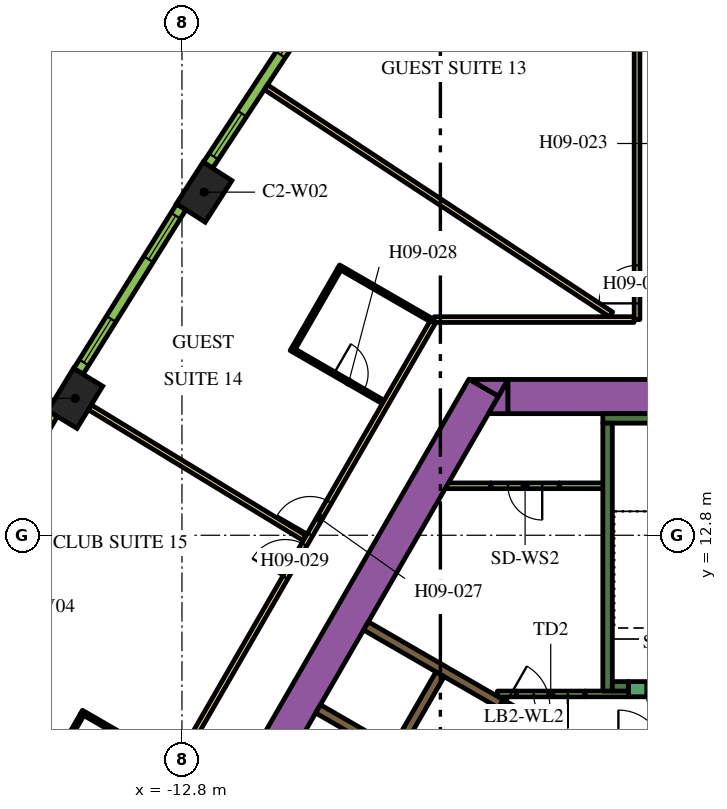
"""IFC4 building model, lengths in metres.
Left out: names, types, materials, properties, quantities, classifications, styles, units other than length and angle.
Written with IfcOpenShell. Run it as: python <this file> out.ifc"""

import sys

from ifc_helpers import new_model, si_unit, direction, frame, frame_2d, origin, origin_2d, place, context, subcontext, project, spatial, polyline, rectangle, outline, extrude, element, fill, save


model = new_model("IFC4")
c1 = context("Model", 3, precision=1e-05, world=origin(), true_north=direction((0.0, 1.0)))
c2 = subcontext(c1, "Body", "Model", "MODEL_VIEW")
j1 = project(units=[si_unit("LENGTHUNIT", "METRE"), si_unit("PLANEANGLEUNIT", "RADIAN")], contexts=[c1])
p1 = place(None, origin())
s1 = spatial("IfcSite", under=j1, at=p1, CompositionType="ELEMENT")
p2 = place(p1, origin())
s2 = spatial("IfcBuilding", under=s1, at=p2, CompositionType="ELEMENT")
p3 = place(p2, frame((0.0, 0.0, 126.6)))
s3 = spatial("IfcBuildingStorey", under=s2, at=p3, CompositionType="ELEMENT", Elevation=126.6)
for number, where, z_axis, x_axis in (
    (1, (-12.217, 21.828, 0.0), (0.0, 0.0, 1.0), (-0.54, -0.842, 0.0)),
    (2, (-15.609, 16.402, 0.0), (0.0, 0.0, 1.0), (-0.52, -0.854, 0.0)),
):
    element("IfcColumn", number, at=place(p3, frame(where, z_axis=z_axis, x_axis=x_axis)), inside=s3, PredefinedType="COLUMN", context=c2, shape_type="SweptSolid", body=[
        extrude(rectangle(XDim=1.3, YDim=0.9, at=origin_2d()), origin(), (0.0, 0.0, 1.0), 3.9),
    ])
p4 = place(p3, frame((-14.268, 0.387, 0.0), z_axis=(0.0, 0.0, 1.0), x_axis=(0.499994617707, 0.866028511231, 0.0)))
e3 = element("IfcWall", 3, at=p4, inside=s3, PredefinedType="SOLIDWALL", context=c2, shape_type="SweptSolid", body=[
    extrude(rectangle(XDim=18.817, YDim=0.9, at=frame_2d((9.409, 0.0))), origin(), (0.0, 0.0, 1.0), 3.9),
])
p5 = place(p3, origin())
e4 = element("IfcWall", 4, at=p5, inside=s3, PredefinedType="SOLIDWALL", context=c2, shape_type="SweptSolid", body=[
    extrude(outline(polyline([(-4.215, 16.9), (-4.469, 16.46), (-5.231, 16.9), (-4.215, 16.9)])), origin(), (0.0, 0.0, 1.0), 3.9),
])
p6 = place(p3, frame((-4.224, 16.45, 0.0), z_axis=(0.0, 0.0, 1.0), x_axis=(1.0, 0.0, 0.0)))
e5 = element("IfcWall", 5, at=p6, inside=s3, PredefinedType="SOLIDWALL", context=c2, shape_type="SweptSolid", body=[
    extrude(rectangle(XDim=9.488, YDim=0.9, at=frame_2d((4.744, 0.0))), origin(), (0.0, 0.0, 1.0), 3.9),
])
e6 = element("IfcWall", 6, at=p5, inside=s3, PredefinedType="SOLIDWALL", context=c2, shape_type="SweptSolid", body=[
    extrude(outline(polyline([(-4.734, 16.0), (-4.226, 16.88), (-4.226, 16.0), (-4.734, 16.0)])), origin(), (0.0, 0.0, 1.0), 3.9),
])
p7 = place(p3, frame((-1.725, 15.875, 0.0), z_axis=(0.0, 0.0, 1.0), x_axis=(1.0, 0.0, 0.0)))
e7 = element("IfcWall", 7, at=p7, inside=s3, PredefinedType="SOLIDWALL", context=c2, shape_type="SweptSolid", body=[
    extrude(rectangle(XDim=3.45, YDim=0.25, at=frame_2d((1.725, 0.0))), origin(), (0.0, 0.0, 1.0), 3.9),
])
p8 = place(p3, frame((-1.6, 8.7, 0.0), z_axis=(0.0, 0.0, 1.0), x_axis=(0.0, 1.0, 0.0)))
e8 = element("IfcWall", 8, at=p8, inside=s3, PredefinedType="SOLIDWALL", context=c2, shape_type="SweptSolid", body=[
    extrude(rectangle(XDim=7.05, YDim=0.25, at=frame_2d((3.525, 0.0))), origin(), (0.0, 0.0, 1.0), 3.9),
])
p9 = place(p3, frame((-1.475, 8.825, 0.0), z_axis=(0.0, 0.0, 1.0), x_axis=(1.0, 0.0, 0.0)))
e9 = element("IfcWall", 9, at=p9, inside=s3, PredefinedType="SOLIDWALL", context=c2, shape_type="SweptSolid", body=[
    extrude(rectangle(XDim=0.425, YDim=0.25, at=frame_2d((0.212, 0.0))), origin(), (0.0, 0.0, 1.0), 3.9),
])
e10 = element("IfcWall", 10, at=p5, inside=s3, PredefinedType="SOLIDWALL", context=c2, shape_type="SweptSolid", body=[
    extrude(outline(polyline([(-3.128, 7.481), (-3.259, 7.557), (-3.134, 7.773), (-3.003, 7.698), (-3.128, 7.481)])), origin(), (0.0, 0.0, 1.0), 3.9),
])
p10 = place(p3, frame((-7.314, 7.132, 0.0), z_axis=(0.0, 0.0, 1.0), x_axis=(-0.866008176907, 0.50002983664, 0.0)))
e11 = element("IfcWall", 11, at=p10, inside=s3, PredefinedType="SOLIDWALL", context=c2, shape_type="SweptSolid", body=[
    extrude(rectangle(XDim=2.2, YDim=0.25, at=frame_2d((1.1, 0.0))), origin(), (0.0, 0.0, 1.0), 3.9),
])
p11 = place(p3, frame((-7.959, 10.415, 0.0), z_axis=(0.0, 0.0, 1.0), x_axis=(0.866020958405, -0.500007699544, 0.0)))
e12 = element("IfcWall", 12, at=p11, inside=s3, PredefinedType="SOLIDWALL", context=c2, shape_type="SweptSolid", body=[
    extrude(rectangle(XDim=4.1, YDim=0.25, at=frame_2d((2.05, 0.0))), origin(), (0.0, 0.0, 1.0), 3.9),
])
p12 = place(p3, frame((-3.997, 8.625, 0.0), z_axis=(0.0, 0.0, 1.0), x_axis=(-1.0, 0.0, 0.0)))
e13 = element("IfcWall", 13, at=p12, inside=s3, PredefinedType="PARTITIONING", context=c2, shape_type="SweptSolid", body=[
    extrude(rectangle(XDim=0.502, YDim=0.15, at=frame_2d((0.251, 0.0))), origin(), (0.0, 0.0, 1.0), 2.75),
])
p13 = place(p3, frame((-5.851, 14.102, 0.0), z_axis=(0.0, 0.0, 1.0), x_axis=(1.0, 0.0, 0.0)))
e14 = element("IfcWall", 14, at=p13, inside=s3, PredefinedType="PARTITIONING", context=c2, shape_type="SweptSolid", body=[
    extrude(rectangle(XDim=1.18, YDim=0.15, at=frame_2d((0.59, 0.0))), origin(), (0.0, 0.0, 1.0), 2.75),
])
p14 = place(p3, frame((-2.196, 8.625, 0.0), z_axis=(0.0, 0.0, 1.0), x_axis=(1.0, 0.0, 0.0)))
e15 = element("IfcWall", 15, at=p14, inside=s3, PredefinedType="PARTITIONING", context=c2, shape_type="SweptSolid", body=[
    extrude(rectangle(XDim=1.146, YDim=0.15, at=frame_2d((0.573, 0.0))), origin(), (0.0, 0.0, 1.0), 2.75),
])
p15 = place(p3, frame((-2.871, 14.102, 0.0), z_axis=(0.0, 0.0, 1.0), x_axis=(1.0, 0.0, 0.0)))
e16 = element("IfcWall", 16, at=p15, inside=s3, PredefinedType="PARTITIONING", context=c2, shape_type="SweptSolid", body=[
    extrude(rectangle(XDim=1.196, YDim=0.15, at=frame_2d((0.598, 0.0))), origin(), (0.0, 0.0, 1.0), 2.75),
])
p16 = place(p3, frame((-6.008, 9.144, 0.0), z_axis=(0.0, 0.0, 1.0), x_axis=(-0.500006956611, -0.866021387346, 0.0)))
e17 = element("IfcWall", 17, at=p16, inside=s3, PredefinedType="SOLIDWALL", context=c2, shape_type="SweptSolid", body=[
    extrude(rectangle(XDim=9.83, YDim=0.25, at=frame_2d((4.915, 0.0))), origin(), (0.0, 0.0, 1.0), 3.9),
])
p17 = place(p16, frame((6.985, 0.0, 0.0)))
e18 = element("IfcOpeningElement", 18, at=p17, cuts=e17, PredefinedType="OPENING", context=c2, shape_type="SweptSolid", body=[
    extrude(rectangle(XDim=0.9, YDim=2.1, at=frame_2d((0.45, 1.05))), frame((0.0, 0.135, 0.0), z_axis=(0.0, -1.0, 0.0), x_axis=(1.0, 0.0, 0.0)), (0.0, 0.0, 1.0), 0.27),
])
p18 = place(p3, frame((1.05, 8.75, 0.0), z_axis=(0.0, 0.0, 1.0), x_axis=(-1.0, 0.0, 0.0)))
e19 = element("IfcWall", 19, at=p18, inside=s3, PredefinedType="SOLIDWALL", context=c2, shape_type="SweptSolid", body=[
    extrude(rectangle(XDim=2.1, YDim=0.4, at=frame_2d((1.05, 0.0))), origin(), (0.0, 0.0, 1.0), 3.9),
])
p19 = place(p18, frame((0.45, 0.0, 0.0)))
e20 = element("IfcOpeningElement", 20, at=p19, cuts=e19, PredefinedType="OPENING", context=c2, shape_type="SweptSolid", body=[
    extrude(rectangle(XDim=1.2, YDim=2.1, at=frame_2d((0.6, 1.05))), frame((0.0, 0.21, 0.0), z_axis=(0.0, -1.0, 0.0), x_axis=(1.0, 0.0, 0.0)), (0.0, 0.0, 1.0), 0.42),
])
p20 = place(p3, frame((-2.196, 8.625, 0.0), z_axis=(0.0, 0.0, 1.0), x_axis=(-1.0, 0.0, 0.0)))
e21 = element("IfcWall", 21, at=p20, inside=s3, PredefinedType="PARTITIONING", context=c2, shape_type="SweptSolid", body=[
    extrude(rectangle(XDim=1.8, YDim=0.15, at=frame_2d((0.9, 0.0))), origin(), (0.0, 0.0, 1.0), 2.75),
])
p21 = place(p20, frame((0.45, 0.0, 0.0)))
e22 = element("IfcOpeningElement", 22, at=p21, cuts=e21, PredefinedType="OPENING", context=c2, shape_type="SweptSolid", body=[
    extrude(rectangle(XDim=0.9, YDim=2.1, at=frame_2d((0.45, 1.05))), frame((0.0, 0.085, 0.0), z_axis=(0.0, -1.0, 0.0), x_axis=(1.0, 0.0, 0.0)), (0.0, 0.0, 1.0), 0.17),
])
p22 = place(p3, frame((-4.409, 8.365, 0.0), z_axis=(0.0, 0.0, 1.0), x_axis=(0.866034573852, -0.49998411664, 0.0)))
e23 = element("IfcWall", 23, at=p22, inside=s3, PredefinedType="SOLIDWALL", context=c2, shape_type="SweptSolid", body=[
    extrude(rectangle(XDim=1.4, YDim=0.25, at=frame_2d((0.7, 0.0))), origin(), (0.0, 0.0, 1.0), 3.9),
])
p23 = place(p22, frame((0.1, 0.0, 0.0)))
e24 = element("IfcOpeningElement", 24, at=p23, cuts=e23, PredefinedType="OPENING", context=c2, shape_type="SweptSolid", body=[
    extrude(rectangle(XDim=1.2, YDim=2.1, at=frame_2d((0.6, 1.05))), frame((0.0, 0.135, 0.0), z_axis=(0.0, -1.0, 0.0), x_axis=(1.0, 0.0, 0.0)), (0.0, 0.0, 1.0), 0.27),
])
p24 = place(p3, frame((-2.871, 14.102, 0.0), z_axis=(0.0, 0.0, 1.0), x_axis=(-1.0, 0.0, 0.0)))
e25 = element("IfcWall", 25, at=p24, inside=s3, PredefinedType="PARTITIONING", context=c2, shape_type="SweptSolid", body=[
    extrude(rectangle(XDim=1.8, YDim=0.15, at=frame_2d((0.9, 0.0))), origin(), (0.0, 0.0, 1.0), 2.75),
])
p25 = place(p24, frame((0.45, 0.0, 0.0)))
e26 = element("IfcOpeningElement", 26, at=p25, cuts=e25, PredefinedType="OPENING", context=c2, shape_type="SweptSolid", body=[
    extrude(rectangle(XDim=0.9, YDim=2.1, at=frame_2d((0.45, 1.05))), frame((0.0, 0.085, 0.0), z_axis=(0.0, -1.0, 0.0), x_axis=(1.0, 0.0, 0.0)), (0.0, 0.0, 1.0), 0.17),
])
p26 = place(p3, frame((-0.825, 18.475, 0.0), z_axis=(0.0, 0.0, 1.0), x_axis=(0.0, 1.0, 0.0)))
e27 = element("IfcWall", 27, at=p26, inside=s3, PredefinedType="PARTITIONING", context=c2, shape_type="SweptSolid", body=[
    extrude(rectangle(XDim=13.623, YDim=0.15, at=frame_2d((6.812, 0.0))), origin(), (0.0, 0.0, 1.0), 2.75),
])
p27 = place(p26, frame((0.427, 0.0, 0.0)))
e28 = element("IfcOpeningElement", 28, at=p27, cuts=e27, PredefinedType="OPENING", context=c2, shape_type="SweptSolid", body=[
    extrude(rectangle(XDim=1.0, YDim=2.1, at=frame_2d((0.5, 1.05))), frame((0.0, 0.085, 0.0), z_axis=(0.0, -1.0, 0.0), x_axis=(1.0, 0.0, 0.0)), (0.0, 0.0, 1.0), 0.17),
])
p28 = place(p3, frame((-6.163, 18.475, 0.0), z_axis=(0.0, 0.0, 1.0), x_axis=(1.0, 0.0, 0.0)))
e29 = element("IfcWall", 29, at=p28, inside=s3, PredefinedType="PARTITIONING", context=c2, shape_type="SweptSolid", body=[
    extrude(rectangle(XDim=5.258, YDim=0.15, at=frame_2d((2.629, 0.0))), origin(), (0.0, 0.0, 1.0), 2.75),
])
p29 = place(p3, frame((-19.081, -3.9, 0.0), z_axis=(0.0, 0.0, 1.0), x_axis=(0.499998313975, 0.866026377209, 0.0)))
e30 = element("IfcWall", 30, at=p29, inside=s3, PredefinedType="PARTITIONING", context=c2, shape_type="SweptSolid", body=[
    extrude(rectangle(XDim=25.766, YDim=0.15, at=frame_2d((12.883, 0.0))), origin(), (0.0, 0.0, 1.0), 2.75),
])
p30 = place(p29, frame((19.306, 0.0, 0.0)))
e31 = element("IfcOpeningElement", 31, at=p30, cuts=e30, PredefinedType="OPENING", context=c2, shape_type="SweptSolid", body=[
    extrude(rectangle(XDim=1.0, YDim=2.1, at=frame_2d((0.5, 1.05))), frame((0.0, 0.085, 0.0), z_axis=(0.0, -1.0, 0.0), x_axis=(1.0, 0.0, 0.0)), (0.0, 0.0, 1.0), 0.17),
])
p31 = place(p29, frame((18.0, 0.0, 0.0)))
e32 = element("IfcOpeningElement", 32, at=p31, cuts=e30, PredefinedType="OPENING", context=c2, shape_type="SweptSolid", body=[
    extrude(rectangle(XDim=1.0, YDim=2.1, at=frame_2d((0.5, 1.05))), frame((0.0, 0.085, 0.0), z_axis=(0.0, -1.0, 0.0), x_axis=(1.0, 0.0, 0.0)), (0.0, 0.0, 1.0), 0.17),
])
p32 = place(p29, frame((7.793, 0.0, 0.0)))
e33 = element("IfcOpeningElement", 33, at=p32, cuts=e30, PredefinedType="OPENING", context=c2, shape_type="SweptSolid", body=[
    extrude(rectangle(XDim=0.9, YDim=2.1, at=frame_2d((0.45, 1.05))), frame((0.0, 0.085, 0.0), z_axis=(0.0, -1.0, 0.0), x_axis=(1.0, 0.0, 0.0)), (0.0, 0.0, 1.0), 0.17),
])
p33 = place(p29, frame((4.674, 0.0, 0.0)))
e34 = element("IfcOpeningElement", 34, at=p33, cuts=e30, PredefinedType="OPENING", context=c2, shape_type="SweptSolid", body=[
    extrude(rectangle(XDim=0.9, YDim=2.1, at=frame_2d((0.45, 1.05))), frame((0.0, 0.085, 0.0), z_axis=(0.0, -1.0, 0.0), x_axis=(1.0, 0.0, 0.0)), (0.0, 0.0, 1.0), 0.17),
])
p34 = place(p29, frame((0.18, 0.0, 0.0)))
e35 = element("IfcOpeningElement", 35, at=p34, cuts=e30, PredefinedType="OPENING", context=c2, shape_type="SweptSolid", body=[
    extrude(rectangle(XDim=1.0, YDim=2.1, at=frame_2d((0.5, 1.05))), frame((0.0, 0.085, 0.0), z_axis=(0.0, -1.0, 0.0), x_axis=(1.0, 0.0, 0.0)), (0.0, 0.0, 1.0), 0.17),
])
p35 = place(p3, frame((-20.581, 8.185, 0.0), z_axis=(0.0, 0.0, 1.0), x_axis=(0.871820720803, -0.489825102233, 0.0)))
e36 = element("IfcWall", 36, at=p35, inside=s3, PredefinedType="PARTITIONING", context=c2, shape_type="SweptSolid", body=[
    extrude(rectangle(XDim=7.257, YDim=0.15, at=frame_2d((3.628, 0.0))), origin(), (0.0, 0.0, 1.0), 2.75),
])
p36 = place(p3, frame((-15.225, 16.167, 0.0), z_axis=(0.0, 0.0, 1.0), x_axis=(0.854088713274, -0.520127359266, 0.0)))
e37 = element("IfcWall", 37, at=p36, inside=s3, PredefinedType="PARTITIONING", context=c2, shape_type="SweptSolid", body=[
    extrude(rectangle(XDim=6.611, YDim=0.15, at=frame_2d((3.305, 0.0))), origin(), (0.0, 0.0, 1.0), 2.75),
])
p37 = place(p3, frame((-10.592, 24.589, 0.0), z_axis=(0.0, 0.0, 1.0), x_axis=(0.835337323748, -0.549737715236, 0.0)))
e38 = element("IfcWall", 38, at=p37, inside=s3, PredefinedType="PARTITIONING", context=c2, shape_type="SweptSolid", body=[
    extrude(rectangle(XDim=10.875, YDim=0.15, at=frame_2d((5.438, 0.0))), origin(), (0.0, 0.0, 1.0), 2.75),
])
p38 = place(p3, frame((-9.928, 17.704, 0.0), z_axis=(0.0, 0.0, 1.0), x_axis=(0.866034573852, -0.49998411664, 0.0)))
e39 = element("IfcWall", 39, at=p38, inside=s3, PredefinedType="PARTITIONING", context=c2, shape_type="SweptSolid", body=[
    extrude(rectangle(XDim=2.8, YDim=0.1, at=frame_2d((1.4, 0.0))), origin(), (0.0, 0.0, 1.0), 2.75),
])
p39 = place(p38, frame((1.3, 0.0, 0.0)))
e40 = element("IfcOpeningElement", 40, at=p39, cuts=e39, PredefinedType="OPENING", context=c2, shape_type="SweptSolid", body=[
    extrude(rectangle(XDim=0.9, YDim=2.1, at=frame_2d((0.45, 1.05))), frame((0.0, 0.06, 0.0), z_axis=(0.0, -1.0, 0.0), x_axis=(1.0, 0.0, 0.0)), (0.0, 0.0, 1.0), 0.12),
])
p40 = place(p3, frame((-9.86, 17.722, 0.0), z_axis=(0.0, 0.0, 1.0), x_axis=(0.500001309137, 0.866024647952, 0.0)))
e41 = element("IfcWall", 41, at=p40, inside=s3, PredefinedType="PARTITIONING", context=c2, shape_type="SweptSolid", body=[
    extrude(rectangle(XDim=2.4, YDim=0.1, at=frame_2d((1.2, 0.0))), origin(), (0.0, 0.0, 1.0), 2.75),
])
p41 = place(p3, frame((-6.253, 18.469, 0.0), z_axis=(0.0, 0.0, 1.0), x_axis=(-0.866034573852, 0.49998411664, 0.0)))
e42 = element("IfcWall", 42, at=p41, inside=s3, PredefinedType="PARTITIONING", context=c2, shape_type="SweptSolid", body=[
    extrude(rectangle(XDim=2.8, YDim=0.1, at=frame_2d((1.4, 0.0))), origin(), (0.0, 0.0, 1.0), 2.75),
])
p42 = place(p3, frame((-13.019, 6.751, 0.0), z_axis=(0.0, 0.0, 1.0), x_axis=(-0.866034573852, 0.49998411664, 0.0)))
e43 = element("IfcWall", 43, at=p42, inside=s3, PredefinedType="PARTITIONING", context=c2, shape_type="SweptSolid", body=[
    extrude(rectangle(XDim=2.8, YDim=0.1, at=frame_2d((1.4, 0.0))), origin(), (0.0, 0.0, 1.0), 2.75),
])
p43 = place(p42, frame((0.6, 0.0, 0.0)))
e44 = element("IfcOpeningElement", 44, at=p43, cuts=e43, PredefinedType="OPENING", context=c2, shape_type="SweptSolid", body=[
    extrude(rectangle(XDim=0.9, YDim=2.1, at=frame_2d((0.45, 1.05))), frame((0.0, 0.06, 0.0), z_axis=(0.0, -1.0, 0.0), x_axis=(1.0, 0.0, 0.0)), (0.0, 0.0, 1.0), 0.12),
])
p44 = place(p3, frame((-15.425, 8.083, 0.0), z_axis=(0.0, 0.0, 1.0), x_axis=(-0.500032858622, -0.866006432019, 0.0)))
e45 = element("IfcWall", 45, at=p44, inside=s3, PredefinedType="PARTITIONING", context=c2, shape_type="SweptSolid", body=[
    extrude(rectangle(XDim=2.36, YDim=0.1, at=frame_2d((1.18, 0.0))), origin(), (0.0, 0.0, 1.0), 2.75),
])
p45 = place(p3, frame((-9.311, 26.799, 0.0), z_axis=(0.0, 0.0, 1.0), x_axis=(-0.549741341923, -0.835334937005, 0.0)))
e46 = element("IfcWall", 46, at=p45, inside=s3, PredefinedType="SOLIDWALL", context=c2, shape_type="SweptSolid", body=[
    extrude(rectangle(XDim=5.1, YDim=0.29, at=frame_2d((2.55, 0.0))), origin(), (0.0, 0.0, 1.0), 3.65),
])
p46 = place(p45, frame((0.273, 0.0, 0.9)))
e47 = element("IfcOpeningElement", 47, at=p46, cuts=e46, PredefinedType="OPENING", context=c2, shape_type="SweptSolid", body=[
    extrude(rectangle(XDim=1.35, YDim=2.15, at=frame_2d((0.675, 1.075))), frame((0.0, 0.155, 0.0), z_axis=(0.0, -1.0, 0.0), x_axis=(1.0, 0.0, 0.0)), (0.0, 0.0, 1.0), 0.31),
])
p47 = place(p45, frame((3.478, 0.0, 0.9)))
e48 = element("IfcOpeningElement", 48, at=p47, cuts=e46, PredefinedType="OPENING", context=c2, shape_type="SweptSolid", body=[
    extrude(rectangle(XDim=1.35, YDim=2.15, at=frame_2d((0.675, 1.075))), frame((0.0, 0.155, 0.0), z_axis=(0.0, -1.0, 0.0), x_axis=(1.0, 0.0, 0.0)), (0.0, 0.0, 1.0), 0.31),
])
p48 = place(p3, frame((-12.82, 21.439, 0.0), z_axis=(0.0, 0.0, 1.0), x_axis=(-0.530072082134, -0.847952585787, 0.0)))
e49 = element("IfcWall", 49, at=p48, inside=s3, PredefinedType="SOLIDWALL", context=c2, shape_type="SweptSolid", body=[
    extrude(rectangle(XDim=5.1, YDim=0.29, at=frame_2d((2.55, 0.0))), origin(), (0.0, 0.0, 1.0), 3.65),
])
p49 = place(p48, frame((0.273, 0.0, 0.9)))
e50 = element("IfcOpeningElement", 50, at=p49, cuts=e49, PredefinedType="OPENING", context=c2, shape_type="SweptSolid", body=[
    extrude(rectangle(XDim=1.35, YDim=2.15, at=frame_2d((0.675, 1.075))), frame((0.0, 0.155, 0.0), z_axis=(0.0, -1.0, 0.0), x_axis=(1.0, 0.0, 0.0)), (0.0, 0.0, 1.0), 0.31),
])
p50 = place(p48, frame((3.478, 0.0, 0.9)))
e51 = element("IfcOpeningElement", 51, at=p50, cuts=e49, PredefinedType="OPENING", context=c2, shape_type="SweptSolid", body=[
    extrude(rectangle(XDim=1.35, YDim=2.15, at=frame_2d((0.675, 1.075))), frame((0.0, 0.155, 0.0), z_axis=(0.0, -1.0, 0.0), x_axis=(1.0, 0.0, 0.0)), (0.0, 0.0, 1.0), 0.31),
])
p51 = place(p3, frame((-16.203, 15.998, 0.0), z_axis=(0.0, 0.0, 1.0), x_axis=(-0.510054281659, -0.860142214847, 0.0)))
e52 = element("IfcWall", 52, at=p51, inside=s3, PredefinedType="SOLIDWALL", context=c2, shape_type="SweptSolid", body=[
    extrude(rectangle(XDim=5.101, YDim=0.29, at=frame_2d((2.55, 0.0))), origin(), (0.0, 0.0, 1.0), 3.65),
])
p52 = place(p51, frame((0.273, 0.0, 0.9)))
e53 = element("IfcOpeningElement", 53, at=p52, cuts=e52, PredefinedType="OPENING", context=c2, shape_type="SweptSolid", body=[
    extrude(rectangle(XDim=1.35, YDim=2.15, at=frame_2d((0.675, 1.075))), frame((0.0, 0.155, 0.0), z_axis=(0.0, -1.0, 0.0), x_axis=(1.0, 0.0, 0.0)), (0.0, 0.0, 1.0), 0.31),
])
p53 = place(p51, frame((3.478, 0.0, 0.9)))
e54 = element("IfcOpeningElement", 54, at=p53, cuts=e52, PredefinedType="OPENING", context=c2, shape_type="SweptSolid", body=[
    extrude(rectangle(XDim=1.35, YDim=2.15, at=frame_2d((0.675, 1.075))), frame((0.0, 0.155, 0.0), z_axis=(0.0, -1.0, 0.0), x_axis=(1.0, 0.0, 0.0)), (0.0, 0.0, 1.0), 0.31),
])
p54 = place(p19, origin())
e55 = element("IfcDoor", 55, at=p54, inside=s3, OperationType="SINGLE_SWING_LEFT", PredefinedType="DOOR", context=c2, shape_type="SweptSolid", body=[
    extrude(rectangle(XDim=1.2, YDim=2.1, at=frame_2d((0.6, 1.05))), frame((0.0, 0.025, 0.0), z_axis=(0.0, -1.0, 0.0), x_axis=(1.0, 0.0, 0.0)), (0.0, 0.0, 1.0), 0.05),
])
fill(e20, e55)
p55 = place(p21, origin())
e56 = element("IfcDoor", 56, at=p55, inside=s3, OperationType="SINGLE_SWING_LEFT", PredefinedType="DOOR", context=c2, shape_type="SweptSolid", body=[
    extrude(rectangle(XDim=0.9, YDim=2.1, at=frame_2d((0.45, 1.05))), frame((0.0, 0.025, 0.0), z_axis=(0.0, -1.0, 0.0), x_axis=(1.0, 0.0, 0.0)), (0.0, 0.0, 1.0), 0.05),
])
fill(e22, e56)
p56 = place(p23, origin())
e57 = element("IfcDoor", 57, at=p56, inside=s3, OperationType="SINGLE_SWING_LEFT", PredefinedType="DOOR", context=c2, shape_type="SweptSolid", body=[
    extrude(rectangle(XDim=1.2, YDim=2.1, at=frame_2d((0.6, 1.05))), frame((0.0, 0.025, 0.0), z_axis=(0.0, -1.0, 0.0), x_axis=(1.0, 0.0, 0.0)), (0.0, 0.0, 1.0), 0.05),
])
fill(e24, e57)
p57 = place(p25, origin())
e58 = element("IfcDoor", 58, at=p57, inside=s3, OperationType="SINGLE_SWING_LEFT", PredefinedType="DOOR", context=c2, shape_type="SweptSolid", body=[
    extrude(rectangle(XDim=0.9, YDim=2.1, at=frame_2d((0.45, 1.05))), frame((0.0, 0.025, 0.0), z_axis=(0.0, -1.0, 0.0), x_axis=(1.0, 0.0, 0.0)), (0.0, 0.0, 1.0), 0.05),
])
fill(e26, e58)
p58 = place(p27, origin())
e59 = element("IfcDoor", 59, at=p58, inside=s3, OperationType="SINGLE_SWING_LEFT", PredefinedType="DOOR", context=c2, shape_type="SweptSolid", body=[
    extrude(rectangle(XDim=1.0, YDim=2.1, at=frame_2d((0.5, 1.05))), frame((0.0, 0.025, 0.0), z_axis=(0.0, -1.0, 0.0), x_axis=(1.0, 0.0, 0.0)), (0.0, 0.0, 1.0), 0.05),
])
fill(e28, e59)
p59 = place(p30, origin())
e60 = element("IfcDoor", 60, at=p59, inside=s3, OperationType="SINGLE_SWING_LEFT", PredefinedType="DOOR", context=c2, shape_type="SweptSolid", body=[
    extrude(rectangle(XDim=1.0, YDim=2.1, at=frame_2d((0.5, 1.05))), frame((0.0, 0.025, 0.0), z_axis=(0.0, -1.0, 0.0), x_axis=(1.0, 0.0, 0.0)), (0.0, 0.0, 1.0), 0.05),
])
fill(e31, e60)
p60 = place(p39, origin())
e61 = element("IfcDoor", 61, at=p60, inside=s3, OperationType="SINGLE_SWING_LEFT", PredefinedType="DOOR", context=c2, shape_type="SweptSolid", body=[
    extrude(rectangle(XDim=0.9, YDim=2.1, at=frame_2d((0.45, 1.05))), frame((0.0, 0.025, 0.0), z_axis=(0.0, -1.0, 0.0), x_axis=(1.0, 0.0, 0.0)), (0.0, 0.0, 1.0), 0.05),
])
fill(e40, e61)
p61 = place(p31, origin())
e62 = element("IfcDoor", 62, at=p61, inside=s3, OperationType="SINGLE_SWING_RIGHT", PredefinedType="DOOR", context=c2, shape_type="SweptSolid", body=[
    extrude(rectangle(XDim=1.0, YDim=2.1, at=frame_2d((0.5, 1.05))), frame((0.0, 0.025, 0.0), z_axis=(0.0, -1.0, 0.0), x_axis=(1.0, 0.0, 0.0)), (0.0, 0.0, 1.0), 0.05),
])
fill(e32, e62)
p62 = place(p46, origin())
e63 = element("IfcWindow", 63, at=p62, inside=s3, PartitioningType="DOUBLE_PANEL_VERTICAL", PredefinedType="WINDOW", context=c2, shape_type="SweptSolid", body=[
    extrude(rectangle(XDim=1.35, YDim=2.15, at=frame_2d((0.675, 1.075))), frame((0.0, 0.015, 0.0), z_axis=(0.0, -1.0, 0.0), x_axis=(1.0, 0.0, 0.0)), (0.0, 0.0, 1.0), 0.06),
])
fill(e47, e63)
p63 = place(p47, origin())
e64 = element("IfcWindow", 64, at=p63, inside=s3, PartitioningType="DOUBLE_PANEL_VERTICAL", PredefinedType="WINDOW", context=c2, shape_type="SweptSolid", body=[
    extrude(rectangle(XDim=1.35, YDim=2.15, at=frame_2d((0.675, 1.075))), frame((0.0, 0.015, 0.0), z_axis=(0.0, -1.0, 0.0), x_axis=(1.0, 0.0, 0.0)), (0.0, 0.0, 1.0), 0.06),
])
fill(e48, e64)
p64 = place(p49, origin())
e65 = element("IfcWindow", 65, at=p64, inside=s3, PartitioningType="DOUBLE_PANEL_VERTICAL", PredefinedType="WINDOW", context=c2, shape_type="SweptSolid", body=[
    extrude(rectangle(XDim=1.35, YDim=2.15, at=frame_2d((0.675, 1.075))), frame((0.0, 0.015, 0.0), z_axis=(0.0, -1.0, 0.0), x_axis=(1.0, 0.0, 0.0)), (0.0, 0.0, 1.0), 0.06),
])
fill(e50, e65)
p65 = place(p50, origin())
e66 = element("IfcWindow", 66, at=p65, inside=s3, PartitioningType="DOUBLE_PANEL_VERTICAL", PredefinedType="WINDOW", context=c2, shape_type="SweptSolid", body=[
    extrude(rectangle(XDim=1.35, YDim=2.15, at=frame_2d((0.675, 1.075))), frame((0.0, 0.015, 0.0), z_axis=(0.0, -1.0, 0.0), x_axis=(1.0, 0.0, 0.0)), (0.0, 0.0, 1.0), 0.06),
])
fill(e51, e66)
save(model, sys.argv[1])
